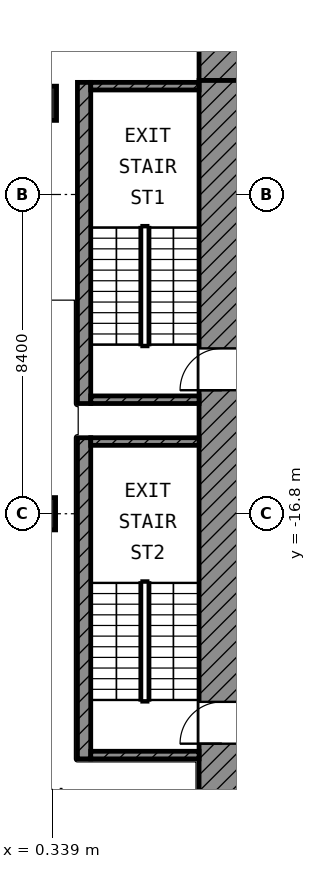
"""IFC4 building model, lengths in metres.
Left out: names, types, materials, properties, quantities, classifications, styles, units other than length and angle.
Written with IfcOpenShell. Run it as: python <this file> out.ifc"""

import sys

from ifc_helpers import new_model, si_unit, direction, frame, frame_2d, origin, origin_2d, place, context, subcontext, project, spatial, rectangle, extrude, element, fill, save


model = new_model("IFC4")
c1 = context("Model", 3, precision=1e-05, world=origin(), true_north=direction((0.0, 1.0)))
c2 = subcontext(c1, "Body", "Model", "MODEL_VIEW")
j1 = project(units=[si_unit("LENGTHUNIT", "METRE"), si_unit("PLANEANGLEUNIT", "RADIAN")], contexts=[c1])
p1 = place(None, origin())
s1 = spatial("IfcSite", under=j1, at=p1, CompositionType="ELEMENT")
p2 = place(p1, origin())
s2 = spatial("IfcBuilding", under=s1, at=p2, CompositionType="ELEMENT")
p3 = place(p2, frame((0.0, 0.0, 226.4)))
s3 = spatial("IfcBuildingStorey", under=s2, at=p3, CompositionType="ELEMENT", Elevation=226.4)
p4 = place(p3, frame((0.0, -6.0, 0.0), z_axis=(0.0, 0.0, 1.0), x_axis=(1.0, 0.0, 0.0)))
e1 = element("IfcColumn", 1, at=p4, inside=s3, PredefinedType="COLUMN", context=c2, shape_type="SweptSolid", body=[
    extrude(rectangle(XDim=0.9, YDim=0.9, at=origin_2d()), origin(), (0.0, 0.0, 1.0), 4.2),
])
p5 = place(p3, frame((0.0, -16.8, 0.0), z_axis=(0.0, 0.0, 1.0), x_axis=(1.0, 0.0, 0.0)))
e2 = element("IfcColumn", 2, at=p5, inside=s3, PredefinedType="COLUMN", context=c2, shape_type="SweptSolid", body=[
    extrude(rectangle(XDim=0.85, YDim=0.85, at=origin_2d()), origin(), (0.0, 0.0, 1.0), 4.2),
])
p6 = place(p3, frame((4.2, -4.8, 0.0), z_axis=(0.0, 0.0, 1.0), x_axis=(1.0, 0.0, 0.0)))
e3 = element("IfcWall", 3, at=p6, inside=s3, PredefinedType="SHEAR", context=c2, shape_type="SweptSolid", body=[
    extrude(rectangle(XDim=20.6, YDim=1.2, at=frame_2d((10.3, 0.0))), origin(), (0.0, 0.0, 1.0), 3.6),
])
p7 = place(p6, frame((1.95, 0.0, 0.0)))
e4 = element("IfcOpeningElement", 4, at=p7, cuts=e3, PredefinedType="OPENING", context=c2, shape_type="SweptSolid", body=[
    extrude(rectangle(XDim=1.1, YDim=2.1, at=frame_2d((0.55, 1.05))), frame((0.0, 0.61, 0.0), z_axis=(0.0, -1.0, 0.0), x_axis=(1.0, 0.0, 0.0)), (0.0, 0.0, 1.0), 1.22),
])
p8 = place(p6, frame((17.95, 0.0, 0.0)))
e5 = element("IfcOpeningElement", 5, at=p8, cuts=e3, PredefinedType="OPENING", context=c2, shape_type="SweptSolid", body=[
    extrude(rectangle(XDim=1.1, YDim=2.1, at=frame_2d((0.55, 1.05))), frame((0.0, 0.61, 0.0), z_axis=(0.0, -1.0, 0.0), x_axis=(1.0, 0.0, 0.0)), (0.0, 0.0, 1.0), 1.22),
])
p9 = place(p3, frame((4.8, -24.8, 0.0), z_axis=(0.0, 0.0, 1.0), x_axis=(0.0, 1.0, 0.0)))
e6 = element("IfcWall", 6, at=p9, inside=s3, PredefinedType="SHEAR", context=c2, shape_type="SweptSolid", body=[
    extrude(rectangle(XDim=19.4, YDim=1.2, at=frame_2d((9.7, 0.0))), origin(), (0.0, 0.0, 1.0), 3.6),
])
p10 = place(p9, frame((11.25, 0.0, 0.0)))
e7 = element("IfcOpeningElement", 7, at=p10, cuts=e6, PredefinedType="OPENING", context=c2, shape_type="SweptSolid", body=[
    extrude(rectangle(XDim=1.1, YDim=2.1, at=frame_2d((0.55, 1.05))), frame((0.0, 0.61, 0.0), z_axis=(0.0, -1.0, 0.0), x_axis=(1.0, 0.0, 0.0)), (0.0, 0.0, 1.0), 1.22),
])
p11 = place(p9, frame((1.95, 0.0, 0.0)))
e8 = element("IfcOpeningElement", 8, at=p11, cuts=e6, PredefinedType="OPENING", context=c2, shape_type="SweptSolid", body=[
    extrude(rectangle(XDim=1.1, YDim=2.1, at=frame_2d((0.55, 1.05))), frame((0.0, 0.61, 0.0), z_axis=(0.0, -1.0, 0.0), x_axis=(1.0, 0.0, 0.0)), (0.0, 0.0, 1.0), 1.22),
])
p12 = place(p3, frame((1.175, -13.9, 0.0), z_axis=(0.0, 0.0, 1.0), x_axis=(0.0, 1.0, 0.0)))
e9 = element("IfcWall", 9, at=p12, inside=s3, PredefinedType="SHEAR", context=c2, shape_type="SweptSolid", body=[
    extrude(rectangle(XDim=8.45, YDim=0.35, at=frame_2d((4.225, 0.0))), origin(), (0.0, 0.0, 1.0), 3.6),
])
for number, where, z_axis, x_axis in (
    (10, (1.35, -5.55, 0.0), (0.0, 0.0, 1.0), (1.0, 0.0, 0.0)),
    (11, (1.35, -13.8, 0.0), (0.0, 0.0, 1.0), (1.0, 0.0, 0.0)),
):
    element("IfcWall", number, at=place(p3, frame(where, z_axis=z_axis, x_axis=x_axis)), inside=s3, PredefinedType="SHEAR", context=c2, shape_type="SweptSolid", body=[
        extrude(rectangle(XDim=2.85, YDim=0.2, at=frame_2d((1.425, 0.0))), origin(), (0.0, 0.0, 1.0), 3.6),
    ])
p13 = place(p3, frame((1.175, -23.25, 0.0), z_axis=(0.0, 0.0, 1.0), x_axis=(0.0, 1.0, 0.0)))
e12 = element("IfcWall", 12, at=p13, inside=s3, PredefinedType="SHEAR", context=c2, shape_type="SweptSolid", body=[
    extrude(rectangle(XDim=8.45, YDim=0.35, at=frame_2d((4.225, 0.0))), origin(), (0.0, 0.0, 1.0), 3.6),
])
for number, where, z_axis, x_axis in (
    (13, (1.35, -14.9, 0.0), (0.0, 0.0, 1.0), (1.0, 0.0, 0.0)),
    (14, (1.35, -23.15, 0.0), (0.0, 0.0, 1.0), (1.0, 0.0, 0.0)),
):
    element("IfcWall", number, at=place(p3, frame(where, z_axis=z_axis, x_axis=x_axis)), inside=s3, PredefinedType="SHEAR", context=c2, shape_type="SweptSolid", body=[
        extrude(rectangle(XDim=2.85, YDim=0.2, at=frame_2d((1.425, 0.0))), origin(), (0.0, 0.0, 1.0), 3.6),
    ])
p14 = place(p10, origin())
e15 = element("IfcDoor", 15, at=p14, inside=s3, OperationType="SINGLE_SWING_LEFT", PredefinedType="DOOR", context=c2, shape_type="SweptSolid", body=[
    extrude(rectangle(XDim=1.1, YDim=2.1, at=frame_2d((0.55, 1.05))), frame((0.0, 0.025, 0.0), z_axis=(0.0, -1.0, 0.0), x_axis=(1.0, 0.0, 0.0)), (0.0, 0.0, 1.0), 0.05),
])
fill(e7, e15)
p15 = place(p11, origin())
e16 = element("IfcDoor", 16, at=p15, inside=s3, OperationType="SINGLE_SWING_LEFT", PredefinedType="DOOR", context=c2, shape_type="SweptSolid", body=[
    extrude(rectangle(XDim=1.1, YDim=2.1, at=frame_2d((0.55, 1.05))), frame((0.0, 0.025, 0.0), z_axis=(0.0, -1.0, 0.0), x_axis=(1.0, 0.0, 0.0)), (0.0, 0.0, 1.0), 0.05),
])
fill(e8, e16)
save(model, sys.argv[1])
